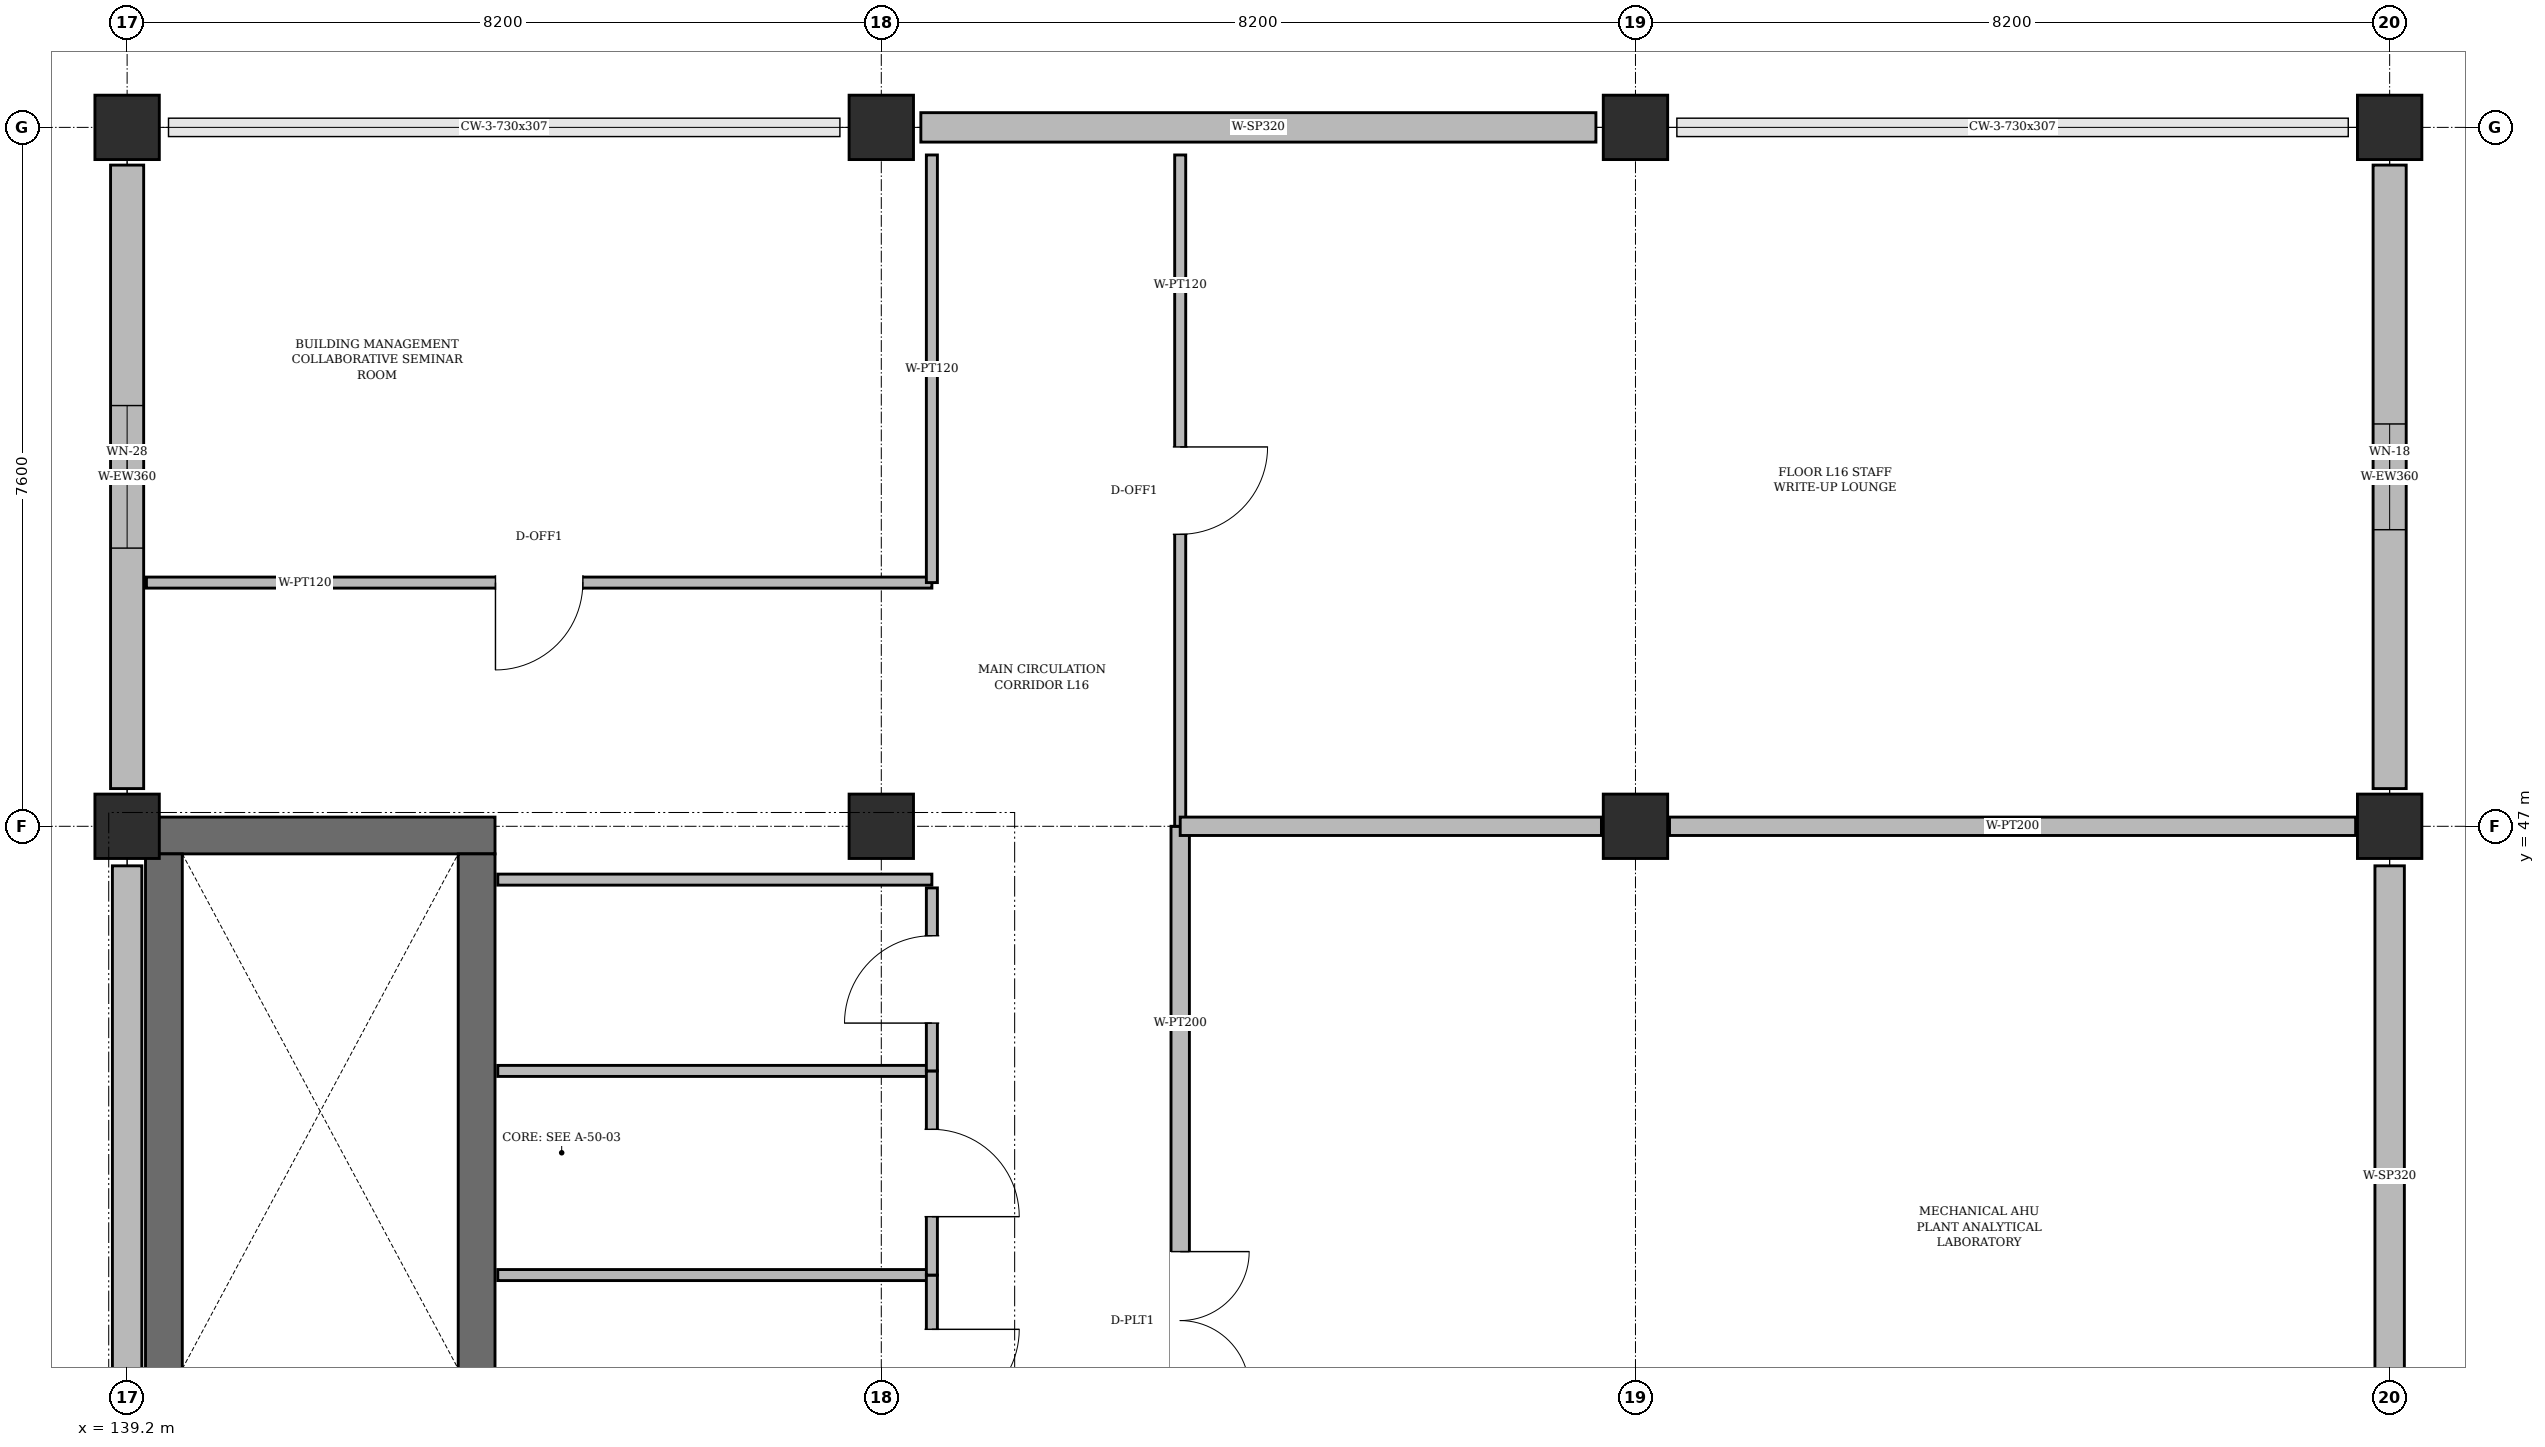
"""IFC4 building model, lengths in metres.
Left out: names, types, materials, properties, quantities, classifications, styles, units other than length and angle.
Written with IfcOpenShell. Run it as: python <this file> out.ifc"""

import sys

from ifc_helpers import new_model, si_unit, direction, frame, frame_2d, origin, origin_2d, place, context, subcontext, project, spatial, rectangle, extrude, element, fill, save


model = new_model("IFC4")
c1 = context("Model", 3, precision=1e-05, world=origin(), true_north=direction((0.0, 1.0)))
c2 = subcontext(c1, "Body", "Model", "MODEL_VIEW")
j1 = project(units=[si_unit("LENGTHUNIT", "METRE"), si_unit("PLANEANGLEUNIT", "RADIAN")], contexts=[c1])
p1 = place(None, origin())
s1 = spatial("IfcSite", under=j1, at=p1, CompositionType="ELEMENT")
p2 = place(p1, origin())
s2 = spatial("IfcBuilding", under=s1, at=p2, CompositionType="ELEMENT")
p3 = place(p2, frame((0.0, 0.0, 70.2)))
s3 = spatial("IfcBuildingStorey", under=s2, at=p3, CompositionType="ELEMENT", Elevation=70.2)
for number, where, z_axis, x_axis in (
    (1, (139.2, 47.0, 0.0), (0.0, 0.0, 1.0), (1.0, 0.0, 0.0)),
    (2, (139.2, 54.6, 0.0), (0.0, 0.0, 1.0), (1.0, 0.0, 0.0)),
    (3, (147.4, 47.0, 0.0), (0.0, 0.0, 1.0), (1.0, 0.0, 0.0)),
    (4, (147.4, 54.6, 0.0), (0.0, 0.0, 1.0), (1.0, 0.0, 0.0)),
    (5, (155.6, 47.0, 0.0), (0.0, 0.0, 1.0), (1.0, 0.0, 0.0)),
    (6, (155.6, 54.6, 0.0), (0.0, 0.0, 1.0), (1.0, 0.0, 0.0)),
    (7, (163.8, 47.0, 0.0), (0.0, 0.0, 1.0), (1.0, 0.0, 0.0)),
    (8, (163.8, 54.6, 0.0), (0.0, 0.0, 1.0), (1.0, 0.0, 0.0)),
):
    element("IfcColumn", number, at=place(p3, frame(where, z_axis=z_axis, x_axis=x_axis)), inside=s3, PredefinedType="COLUMN", context=c2, shape_type="SweptSolid", body=[
        extrude(rectangle(XDim=0.7, YDim=0.7, at=origin_2d()), origin(), (0.0, 0.0, 1.0), 3.67),
    ])
p4 = place(p3, frame((163.8, 39.83, 0.0), z_axis=(0.0, 0.0, 1.0), x_axis=(0.0, 1.0, 0.0)))
e9 = element("IfcWall", 9, at=p4, inside=s3, PredefinedType="PARAPET", context=c2, shape_type="SweptSolid", body=[
    extrude(rectangle(XDim=6.74, YDim=0.32, at=frame_2d((3.37, 0.0))), origin(), (0.0, 0.0, 1.0), 0.25),
])
p5 = place(p3, frame((163.8, 47.41, 0.0), z_axis=(0.0, 0.0, 1.0), x_axis=(0.0, 1.0, 0.0)))
e10 = element("IfcWall", 10, at=p5, inside=s3, PredefinedType="SOLIDWALL", context=c2, shape_type="SweptSolid", body=[
    extrude(rectangle(XDim=6.78, YDim=0.36, at=frame_2d((3.39, 0.0))), origin(), (0.0, 0.0, 1.0), 3.055),
])
p6 = place(p5, frame((2.815, 0.0, 0.95)))
e11 = element("IfcOpeningElement", 11, at=p6, cuts=e10, PredefinedType="OPENING", context=c2, shape_type="SweptSolid", body=[
    extrude(rectangle(XDim=1.15, YDim=1.5, at=frame_2d((0.575, 0.75))), frame((0.0, 0.192, 0.0), z_axis=(0.0, -1.0, 0.0), x_axis=(1.0, 0.0, 0.0)), (0.0, 0.0, 1.0), 0.384),
])
p7 = place(p3, frame((155.17, 54.6, 0.0), z_axis=(0.0, 0.0, 1.0), x_axis=(-1.0, 0.0, 0.0)))
e12 = element("IfcWall", 12, at=p7, inside=s3, PredefinedType="PARAPET", context=c2, shape_type="SweptSolid", body=[
    extrude(rectangle(XDim=7.34, YDim=0.32, at=frame_2d((3.67, 0.0))), origin(), (0.0, 0.0, 1.0), 0.25),
])
p8 = place(p3, frame((139.2, 54.19, 0.0), z_axis=(0.0, 0.0, 1.0), x_axis=(0.0, -1.0, 0.0)))
e13 = element("IfcWall", 13, at=p8, inside=s3, PredefinedType="SOLIDWALL", context=c2, shape_type="SweptSolid", body=[
    extrude(rectangle(XDim=6.78, YDim=0.36, at=frame_2d((3.39, 0.0))), origin(), (0.0, 0.0, 1.0), 3.055),
])
p9 = place(p8, frame((2.615, 0.0, 0.75)))
e14 = element("IfcOpeningElement", 14, at=p9, cuts=e13, PredefinedType="OPENING", context=c2, shape_type="SweptSolid", body=[
    extrude(rectangle(XDim=1.55, YDim=2.05, at=frame_2d((0.775, 1.025))), frame((0.0, 0.192, 0.0), z_axis=(0.0, -1.0, 0.0), x_axis=(1.0, 0.0, 0.0)), (0.0, 0.0, 1.0), 0.384),
])
p10 = place(p3, frame((139.2, 46.57, 0.0), z_axis=(0.0, 0.0, 1.0), x_axis=(0.0, -1.0, 0.0)))
e15 = element("IfcWall", 15, at=p10, inside=s3, PredefinedType="PARAPET", context=c2, shape_type="SweptSolid", body=[
    extrude(rectangle(XDim=6.74, YDim=0.32, at=frame_2d((3.37, 0.0))), origin(), (0.0, 0.0, 1.0), 0.25),
])
p11 = place(p3, frame((139.4, 46.9, 0.0), z_axis=(0.0, 0.0, 1.0), x_axis=(1.0, 0.0, 0.0)))
e16 = element("IfcWall", 16, at=p11, inside=s3, PredefinedType="SHEAR", context=c2, shape_type="SweptSolid", body=[
    extrude(rectangle(XDim=3.8, YDim=0.4, at=frame_2d((1.9, 0.0))), origin(), (0.0, 0.0, 1.0), 3.67),
])
for number, where, z_axis, x_axis in (
    (17, (139.6, 39.7, 0.0), (0.0, 0.0, 1.0), (0.0, 1.0, 0.0)),
    (18, (143.0, 39.7, 0.0), (0.0, 0.0, 1.0), (0.0, 1.0, 0.0)),
):
    element("IfcWall", number, at=place(p3, frame(where, z_axis=z_axis, x_axis=x_axis)), inside=s3, PredefinedType="SHEAR", context=c2, shape_type="SweptSolid", body=[
        extrude(rectangle(XDim=7.0, YDim=0.4, at=frame_2d((3.5, 0.0))), origin(), (0.0, 0.0, 1.0), 3.67),
    ])
p12 = place(p3, frame((143.23, 46.42, 0.0), z_axis=(0.0, 0.0, 1.0), x_axis=(1.0, 0.0, 0.0)))
e19 = element("IfcWall", 19, at=p12, inside=s3, PredefinedType="PARTITIONING", context=c2, shape_type="SweptSolid", body=[
    extrude(rectangle(XDim=4.72, YDim=0.12, at=frame_2d((2.36, 0.0))), origin(), (0.0, 0.0, 1.0), 3.605),
])
p13 = place(p3, frame((143.23, 42.12, 0.0), z_axis=(0.0, 0.0, 1.0), x_axis=(1.0, 0.0, 0.0)))
e20 = element("IfcWall", 20, at=p13, inside=s3, PredefinedType="PARTITIONING", context=c2, shape_type="SweptSolid", body=[
    extrude(rectangle(XDim=4.72, YDim=0.12, at=frame_2d((2.36, 0.0))), origin(), (0.0, 0.0, 1.0), 3.145),
])
p14 = place(p3, frame((147.95, 42.12, 0.0), z_axis=(0.0, 0.0, 1.0), x_axis=(0.0, -1.0, 0.0)))
e21 = element("IfcWall", 21, at=p14, inside=s3, PredefinedType="PARTITIONING", context=c2, shape_type="SweptSolid", body=[
    extrude(rectangle(XDim=2.13, YDim=0.12, at=frame_2d((1.065, 0.0))), origin(), (0.0, 0.0, 1.0), 3.605),
])
p15 = place(p14, frame((0.59, 0.0, 0.0)))
e22 = element("IfcOpeningElement", 22, at=p15, cuts=e21, PredefinedType="OPENING", context=c2, shape_type="SweptSolid", body=[
    extrude(rectangle(XDim=0.95, YDim=2.15, at=frame_2d((0.475, 1.075))), frame((0.0, 0.072, 0.0), z_axis=(0.0, -1.0, 0.0), x_axis=(1.0, 0.0, 0.0)), (0.0, 0.0, 1.0), 0.144),
])
p16 = place(p3, frame((143.23, 44.34, 0.0), z_axis=(0.0, 0.0, 1.0), x_axis=(1.0, 0.0, 0.0)))
e23 = element("IfcWall", 23, at=p16, inside=s3, PredefinedType="PARTITIONING", context=c2, shape_type="SweptSolid", body=[
    extrude(rectangle(XDim=4.72, YDim=0.12, at=frame_2d((2.36, 0.0))), origin(), (0.0, 0.0, 1.0), 3.095),
])
p17 = place(p3, frame((147.95, 44.34, 0.0), z_axis=(0.0, 0.0, 1.0), x_axis=(0.0, -1.0, 0.0)))
e24 = element("IfcWall", 24, at=p17, inside=s3, PredefinedType="PARTITIONING", context=c2, shape_type="SweptSolid", body=[
    extrude(rectangle(XDim=2.22, YDim=0.12, at=frame_2d((1.11, 0.0))), origin(), (0.0, 0.0, 1.0), 3.605),
])
p18 = place(p17, frame((0.635, 0.0, 0.0)))
e25 = element("IfcOpeningElement", 25, at=p18, cuts=e24, PredefinedType="OPENING", context=c2, shape_type="SweptSolid", body=[
    extrude(rectangle(XDim=0.95, YDim=2.15, at=frame_2d((0.475, 1.075))), frame((0.0, 0.072, 0.0), z_axis=(0.0, -1.0, 0.0), x_axis=(1.0, 0.0, 0.0)), (0.0, 0.0, 1.0), 0.144),
])
p19 = place(p3, frame((147.95, 46.33, 0.0), z_axis=(0.0, 0.0, 1.0), x_axis=(0.0, -1.0, 0.0)))
e26 = element("IfcWall", 26, at=p19, inside=s3, PredefinedType="PARTITIONING", context=c2, shape_type="SweptSolid", body=[
    extrude(rectangle(XDim=1.99, YDim=0.12, at=frame_2d((0.995, 0.0))), origin(), (0.0, 0.0, 1.0), 3.605),
])
p20 = place(p19, frame((0.52, 0.0, 0.0)))
e27 = element("IfcOpeningElement", 27, at=p20, cuts=e26, PredefinedType="OPENING", context=c2, shape_type="SweptSolid", body=[
    extrude(rectangle(XDim=0.95, YDim=2.15, at=frame_2d((0.475, 1.075))), frame((0.0, 0.072, 0.0), z_axis=(0.0, -1.0, 0.0), x_axis=(1.0, 0.0, 0.0)), (0.0, 0.0, 1.0), 0.144),
])
p21 = place(p3, frame((150.65, 47.0, 0.0), z_axis=(0.0, 0.0, 1.0), x_axis=(0.0, -1.0, 0.0)))
e28 = element("IfcWall", 28, at=p21, inside=s3, PredefinedType="PARTITIONING", context=c2, shape_type="SweptSolid", body=[
    extrude(rectangle(XDim=10.75, YDim=0.2, at=frame_2d((5.375, 0.0))), origin(), (0.0, 0.0, 1.0), 3.605),
])
p22 = place(p21, frame((4.625, 0.0, 0.0)))
e29 = element("IfcOpeningElement", 29, at=p22, cuts=e28, PredefinedType="OPENING", context=c2, shape_type="SweptSolid", body=[
    extrude(rectangle(XDim=1.5, YDim=2.2, at=frame_2d((0.75, 1.1))), frame((0.0, 0.112, 0.0), z_axis=(0.0, -1.0, 0.0), x_axis=(1.0, 0.0, 0.0)), (0.0, 0.0, 1.0), 0.224),
])
p23 = place(p3, frame((139.41, 49.65, 0.0), z_axis=(0.0, 0.0, 1.0), x_axis=(1.0, 0.0, 0.0)))
e30 = element("IfcWall", 30, at=p23, inside=s3, PredefinedType="PARTITIONING", context=c2, shape_type="SweptSolid", body=[
    extrude(rectangle(XDim=8.54, YDim=0.12, at=frame_2d((4.27, 0.0))), origin(), (0.0, 0.0, 1.0), 3.095),
])
p24 = place(p23, frame((3.795, 0.0, 0.0)))
e31 = element("IfcOpeningElement", 31, at=p24, cuts=e30, PredefinedType="OPENING", context=c2, shape_type="SweptSolid", body=[
    extrude(rectangle(XDim=0.95, YDim=2.2, at=frame_2d((0.475, 1.1))), frame((0.0, 0.072, 0.0), z_axis=(0.0, -1.0, 0.0), x_axis=(1.0, 0.0, 0.0)), (0.0, 0.0, 1.0), 0.144),
])
p25 = place(p3, frame((147.95, 49.65, 0.0), z_axis=(0.0, 0.0, 1.0), x_axis=(0.0, 1.0, 0.0)))
e32 = element("IfcWall", 32, at=p25, inside=s3, PredefinedType="PARTITIONING", context=c2, shape_type="SweptSolid", body=[
    extrude(rectangle(XDim=4.65, YDim=0.12, at=frame_2d((2.325, 0.0))), origin(), (0.0, 0.0, 1.0), 3.605),
])
p26 = place(p3, frame((150.65, 54.3, 0.0), z_axis=(0.0, 0.0, 1.0), x_axis=(0.0, -1.0, 0.0)))
e33 = element("IfcWall", 33, at=p26, inside=s3, PredefinedType="PARTITIONING", context=c2, shape_type="SweptSolid", body=[
    extrude(rectangle(XDim=7.3, YDim=0.12, at=frame_2d((3.65, 0.0))), origin(), (0.0, 0.0, 1.0), 3.605),
])
p27 = place(p26, frame((3.175, 0.0, 0.0)))
e34 = element("IfcOpeningElement", 34, at=p27, cuts=e33, PredefinedType="OPENING", context=c2, shape_type="SweptSolid", body=[
    extrude(rectangle(XDim=0.95, YDim=2.2, at=frame_2d((0.475, 1.1))), frame((0.0, 0.072, 0.0), z_axis=(0.0, -1.0, 0.0), x_axis=(1.0, 0.0, 0.0)), (0.0, 0.0, 1.0), 0.144),
])
p28 = place(p3, frame((150.65, 47.0, 0.0), z_axis=(0.0, 0.0, 1.0), x_axis=(1.0, 0.0, 0.0)))
e35 = element("IfcWall", 35, at=p28, inside=s3, PredefinedType="PARTITIONING", context=c2, shape_type="SweptSolid", body=[
    extrude(rectangle(XDim=4.58, YDim=0.2, at=frame_2d((2.29, 0.0))), origin(), (0.0, 0.0, 1.0), 3.005),
])
p29 = place(p3, frame((155.97, 47.0, 0.0), z_axis=(0.0, 0.0, 1.0), x_axis=(1.0, 0.0, 0.0)))
e36 = element("IfcWall", 36, at=p29, inside=s3, PredefinedType="PARTITIONING", context=c2, shape_type="SweptSolid", body=[
    extrude(rectangle(XDim=7.46, YDim=0.2, at=frame_2d((3.73, 0.0))), origin(), (0.0, 0.0, 1.0), 3.005),
])
p30 = place(p6, origin())
e37 = element("IfcWindow", 37, at=p30, inside=s3, PartitioningType="SINGLE_PANEL", PredefinedType="WINDOW", context=c2, shape_type="SweptSolid", body=[
    extrude(rectangle(XDim=1.15, YDim=1.5, at=frame_2d((0.575, 0.75))), frame((0.0, 0.03, 0.0), z_axis=(0.0, -1.0, 0.0), x_axis=(1.0, 0.0, 0.0)), (0.0, 0.0, 1.0), 0.06),
])
fill(e11, e37)
p31 = place(p9, origin())
e38 = element("IfcWindow", 38, at=p31, inside=s3, PartitioningType="DOUBLE_PANEL_VERTICAL", PredefinedType="WINDOW", context=c2, shape_type="SweptSolid", body=[
    extrude(rectangle(XDim=1.55, YDim=2.05, at=frame_2d((0.775, 1.025))), frame((0.0, 0.03, 0.0), z_axis=(0.0, -1.0, 0.0), x_axis=(1.0, 0.0, 0.0)), (0.0, 0.0, 1.0), 0.06),
])
fill(e14, e38)
p32 = place(p15, origin())
e39 = element("IfcDoor", 39, at=p32, inside=s3, OperationType="SINGLE_SWING_LEFT", PredefinedType="DOOR", context=c2, shape_type="SweptSolid", body=[
    extrude(rectangle(XDim=0.95, YDim=2.15, at=frame_2d((0.475, 1.075))), frame((0.0, 0.025, 0.0), z_axis=(0.0, -1.0, 0.0), x_axis=(1.0, 0.0, 0.0)), (0.0, 0.0, 1.0), 0.05),
])
fill(e22, e39)
p33 = place(p18, origin())
e40 = element("IfcDoor", 40, at=p33, inside=s3, OperationType="SINGLE_SWING_RIGHT", PredefinedType="DOOR", context=c2, shape_type="SweptSolid", body=[
    extrude(rectangle(XDim=0.95, YDim=2.15, at=frame_2d((0.475, 1.075))), frame((0.0, 0.025, 0.0), z_axis=(0.0, -1.0, 0.0), x_axis=(1.0, 0.0, 0.0)), (0.0, 0.0, 1.0), 0.05),
])
fill(e25, e40)
p34 = place(p20, frame((0.95, 0.0, 0.0), z_axis=(0.0, 0.0, 1.0), x_axis=(-1.0, 0.0, 0.0)))
e41 = element("IfcDoor", 41, at=p34, inside=s3, OperationType="SINGLE_SWING_LEFT", PredefinedType="DOOR", context=c2, shape_type="SweptSolid", body=[
    extrude(rectangle(XDim=0.95, YDim=2.15, at=frame_2d((0.475, 1.075))), frame((0.0, 0.025, 0.0), z_axis=(0.0, -1.0, 0.0), x_axis=(1.0, 0.0, 0.0)), (0.0, 0.0, 1.0), 0.05),
])
fill(e27, e41)
p35 = place(p22, origin())
e42 = element("IfcDoor", 42, at=p35, inside=s3, OperationType="DOUBLE_DOOR_SINGLE_SWING", PredefinedType="DOOR", context=c2, shape_type="SweptSolid", body=[
    extrude(rectangle(XDim=1.5, YDim=2.2, at=frame_2d((0.75, 1.1))), frame((0.0, 0.025, 0.0), z_axis=(0.0, -1.0, 0.0), x_axis=(1.0, 0.0, 0.0)), (0.0, 0.0, 1.0), 0.05),
])
fill(e29, e42)
p36 = place(p24, frame((0.95, 0.0, 0.0), z_axis=(0.0, 0.0, 1.0), x_axis=(-1.0, 0.0, 0.0)))
e43 = element("IfcDoor", 43, at=p36, inside=s3, OperationType="SINGLE_SWING_RIGHT", PredefinedType="DOOR", context=c2, shape_type="SweptSolid", body=[
    extrude(rectangle(XDim=0.95, YDim=2.2, at=frame_2d((0.475, 1.1))), frame((0.0, 0.025, 0.0), z_axis=(0.0, -1.0, 0.0), x_axis=(1.0, 0.0, 0.0)), (0.0, 0.0, 1.0), 0.05),
])
fill(e31, e43)
p37 = place(p27, origin())
e44 = element("IfcDoor", 44, at=p37, inside=s3, OperationType="SINGLE_SWING_LEFT", PredefinedType="DOOR", context=c2, shape_type="SweptSolid", body=[
    extrude(rectangle(XDim=0.95, YDim=2.2, at=frame_2d((0.475, 1.1))), frame((0.0, 0.025, 0.0), z_axis=(0.0, -1.0, 0.0), x_axis=(1.0, 0.0, 0.0)), (0.0, 0.0, 1.0), 0.05),
])
fill(e34, e44)
save(model, sys.argv[1])
